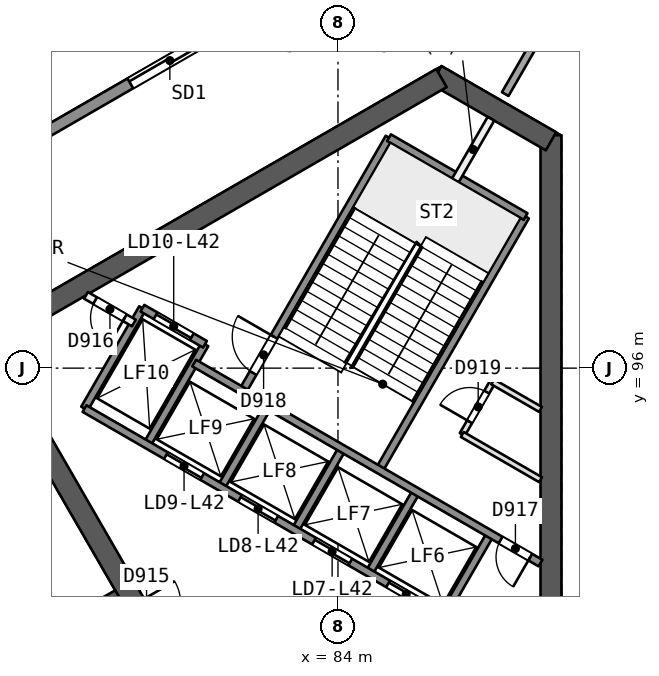
"""IFC4 building model, lengths in metres.
Left out: names, types, materials, properties, quantities, classifications, styles, units other than length and angle.
Written with IfcOpenShell. Run it as: python <this file> out.ifc"""

import sys

from ifc_helpers import new_model, si_unit, direction, frame, frame_2d, origin, place, context, subcontext, project, spatial, rectangle, extrude, element, fill, save


model = new_model("IFC4")
c1 = context("Model", 3, precision=1e-05, world=origin(), true_north=direction((0.0, 1.0)))
c2 = subcontext(c1, "Body", "Model", "MODEL_VIEW")
j1 = project(units=[si_unit("LENGTHUNIT", "METRE"), si_unit("PLANEANGLEUNIT", "RADIAN")], contexts=[c1])
p1 = place(None, origin())
s1 = spatial("IfcSite", under=j1, at=p1, CompositionType="ELEMENT")
p2 = place(p1, origin())
s2 = spatial("IfcBuilding", under=s1, at=p2, CompositionType="ELEMENT")
p3 = place(p2, frame((0.0, 0.0, 174.8)))
s3 = spatial("IfcBuildingStorey", under=s2, at=p3, CompositionType="ELEMENT", Elevation=174.8)
p4 = place(p3, frame((89.605, 88.069, 0.0), z_axis=(0.0, 0.0, 1.0), x_axis=(0.0, 1.0, 0.0)))
e1 = element("IfcWall", 1, at=p4, inside=s3, PredefinedType="SHEAR", context=c2, shape_type="SweptSolid", body=[
    extrude(rectangle(XDim=14.058, YDim=0.55, at=frame_2d((7.029, 0.0))), origin(), (0.0, 0.0, 1.0), 3.7),
])
p5 = place(p3, frame((89.605, 101.969, 0.0), z_axis=(0.0, 0.0, 1.0), x_axis=(-0.865997833373, 0.500047750313, 0.0)))
e2 = element("IfcWall", 2, at=p5, inside=s3, PredefinedType="SHEAR", context=c2, shape_type="SweptSolid", body=[
    extrude(rectangle(XDim=3.487, YDim=0.55, at=frame_2d((1.743, 0.0))), origin(), (0.0, 0.0, 1.0), 3.7),
])
p6 = place(p3, frame((86.723, 103.633, 0.0), z_axis=(0.0, 0.0, 1.0), x_axis=(-0.866023530946, -0.500003243837, 0.0)))
e3 = element("IfcWall", 3, at=p6, inside=s3, PredefinedType="SHEAR", context=c2, shape_type="SweptSolid", body=[
    extrude(rectangle(XDim=14.175, YDim=0.55, at=frame_2d((7.087, 0.0))), origin(), (0.0, 0.0, 1.0), 3.7),
])
p7 = place(p3, frame((74.686, 96.683, 0.0), z_axis=(0.0, 0.0, 1.0), x_axis=(0.499997818338, -0.866026663364, 0.0)))
e4 = element("IfcWall", 4, at=p7, inside=s3, PredefinedType="SHEAR", context=c2, shape_type="SweptSolid", body=[
    extrude(rectangle(XDim=10.105, YDim=0.55, at=frame_2d((5.052, 0.0))), origin(), (0.0, 0.0, 1.0), 3.7),
])
p8 = place(p7, frame((7.955, 0.0, 0.0)))
e5 = element("IfcOpeningElement", 5, at=p8, cuts=e4, PredefinedType="OPENING", context=c2, shape_type="SweptSolid", body=[
    extrude(rectangle(XDim=1.2, YDim=2.1, at=frame_2d((0.6, 1.05))), frame((0.0, 0.286, 0.0), z_axis=(0.0, -1.0, 0.0), x_axis=(1.0, 0.0, 0.0)), (0.0, 0.0, 1.0), 0.571),
])
p9 = place(p3, frame((78.2, 90.046, 0.0), z_axis=(0.0, 0.0, 1.0), x_axis=(-0.866026492143, -0.499998114903, 0.0)))
e6 = element("IfcWall", 6, at=p9, inside=s3, PredefinedType="SHEAR", context=c2, shape_type="SweptSolid", body=[
    extrude(rectangle(XDim=15.588, YDim=0.25, at=frame_2d((7.794, 0.0))), origin(), (0.0, 0.0, 1.0), 3.25),
])
p10 = place(p9, frame((2.306, 0.0, 0.0)))
e7 = element("IfcOpeningElement", 7, at=p10, cuts=e6, PredefinedType="OPENING", context=c2, shape_type="SweptSolid", body=[
    extrude(rectangle(XDim=1.0, YDim=2.1, at=frame_2d((0.5, 1.05))), frame((0.0, 0.135, 0.0), z_axis=(0.0, -1.0, 0.0), x_axis=(1.0, 0.0, 0.0)), (0.0, 0.0, 1.0), 0.271),
])
p11 = place(p9, frame((6.643, 0.0, 0.0)))
e8 = element("IfcOpeningElement", 8, at=p11, cuts=e6, PredefinedType="OPENING", context=c2, shape_type="SweptSolid", body=[
    extrude(rectangle(XDim=0.9, YDim=2.1, at=frame_2d((0.45, 1.05))), frame((0.0, 0.135, 0.0), z_axis=(0.0, -1.0, 0.0), x_axis=(1.0, 0.0, 0.0)), (0.0, 0.0, 1.0), 0.271),
])
p12 = place(p9, frame((9.604, 0.0, 0.0)))
e9 = element("IfcOpeningElement", 9, at=p12, cuts=e6, PredefinedType="OPENING", context=c2, shape_type="SweptSolid", body=[
    extrude(rectangle(XDim=0.9, YDim=2.1, at=frame_2d((0.45, 1.05))), frame((0.0, 0.135, 0.0), z_axis=(0.0, -1.0, 0.0), x_axis=(1.0, 0.0, 0.0)), (0.0, 0.0, 1.0), 0.271),
])
p13 = place(p9, frame((13.062, 0.0, 0.0)))
e10 = element("IfcOpeningElement", 10, at=p13, cuts=e6, PredefinedType="OPENING", context=c2, shape_type="SweptSolid", body=[
    extrude(rectangle(XDim=1.0, YDim=2.1, at=frame_2d((0.5, 1.05))), frame((0.0, 0.135, 0.0), z_axis=(0.0, -1.0, 0.0), x_axis=(1.0, 0.0, 0.0)), (0.0, 0.0, 1.0), 0.271),
])
p14 = place(p3, frame((91.135, 107.948, 0.0), z_axis=(0.0, 0.0, 1.0), x_axis=(-0.499980071345, -0.866036909293, 0.0)))
e11 = element("IfcWall", 11, at=p14, inside=s3, PredefinedType="PARTITIONING", context=c2, shape_type="SweptSolid", body=[
    extrude(rectangle(XDim=5.469, YDim=0.2, at=frame_2d((2.734, 0.0))), origin(), (0.0, 0.0, 1.0), 3.25),
])
p15 = place(p3, frame((72.136, 96.937, 0.0), z_axis=(0.0, 0.0, 1.0), x_axis=(0.499990139034, -0.866031096941, 0.0)))
e12 = element("IfcWall", 12, at=p15, inside=s3, PredefinedType="PARTITIONING", context=c2, shape_type="SweptSolid", body=[
    extrude(rectangle(XDim=9.0, YDim=0.2, at=frame_2d((4.5, 0.0))), origin(), (0.0, 0.0, 1.0), 3.25),
])
p16 = place(p3, frame((42.58, 82.733, 0.0), z_axis=(0.0, 0.0, 1.0), x_axis=(0.866025382531, 0.500000036812, 0.0)))
e13 = element("IfcWall", 13, at=p16, inside=s3, PredefinedType="SOLIDWALL", context=c2, shape_type="SweptSolid", body=[
    extrude(rectangle(XDim=53.42, YDim=0.3, at=frame_2d((26.71, 0.0))), origin(), (0.0, 0.0, 1.0), 3.25),
])
p17 = place(p16, frame((30.499, 0.0, 0.0)))
e14 = element("IfcOpeningElement", 14, at=p17, cuts=e13, PredefinedType="OPENING", context=c2, shape_type="SweptSolid", body=[
    extrude(rectangle(XDim=2.4, YDim=2.4, at=frame_2d((1.2, 1.2))), frame((0.0, 0.161, 0.0), z_axis=(0.0, -1.0, 0.0), x_axis=(1.0, 0.0, 0.0)), (0.0, 0.0, 1.0), 0.321),
])
p18 = place(p16, frame((41.52, 0.0, 0.0)))
e15 = element("IfcOpeningElement", 15, at=p18, cuts=e13, PredefinedType="OPENING", context=c2, shape_type="SweptSolid", body=[
    extrude(rectangle(XDim=2.4, YDim=2.4, at=frame_2d((1.2, 1.2))), frame((0.0, 0.161, 0.0), z_axis=(0.0, -1.0, 0.0), x_axis=(1.0, 0.0, 0.0)), (0.0, 0.0, 1.0), 0.321),
])
p19 = place(p16, frame((19.742, 0.0, 0.0)))
e16 = element("IfcOpeningElement", 16, at=p19, cuts=e13, PredefinedType="OPENING", context=c2, shape_type="SweptSolid", body=[
    extrude(rectangle(XDim=2.4, YDim=2.4, at=frame_2d((1.2, 1.2))), frame((0.0, 0.161, 0.0), z_axis=(0.0, -1.0, 0.0), x_axis=(1.0, 0.0, 0.0)), (0.0, 0.0, 1.0), 0.321),
])
p20 = place(p16, frame((9.507, 0.0, 0.0)))
e17 = element("IfcOpeningElement", 17, at=p20, cuts=e13, PredefinedType="OPENING", context=c2, shape_type="SweptSolid", body=[
    extrude(rectangle(XDim=2.4, YDim=2.4, at=frame_2d((1.2, 1.2))), frame((0.0, 0.161, 0.0), z_axis=(0.0, -1.0, 0.0), x_axis=(1.0, 0.0, 0.0)), (0.0, 0.0, 1.0), 0.321),
])
p21 = place(p16, frame((26.512, 0.0, 0.9)))
e18 = element("IfcOpeningElement", 18, at=p21, cuts=e13, PredefinedType="OPENING", context=c2, shape_type="SweptSolid", body=[
    extrude(rectangle(XDim=1.8, YDim=1.5, at=frame_2d((0.9, 0.75))), frame((0.0, 0.161, 0.0), z_axis=(0.0, -1.0, 0.0), x_axis=(1.0, 0.0, 0.0)), (0.0, 0.0, 1.0), 0.321),
])
p22 = place(p16, frame((23.55, 0.0, 0.9)))
e19 = element("IfcOpeningElement", 19, at=p22, cuts=e13, PredefinedType="OPENING", context=c2, shape_type="SweptSolid", body=[
    extrude(rectangle(XDim=1.8, YDim=1.5, at=frame_2d((0.9, 0.75))), frame((0.0, 0.161, 0.0), z_axis=(0.0, -1.0, 0.0), x_axis=(1.0, 0.0, 0.0)), (0.0, 0.0, 1.0), 0.321),
])
p23 = place(p3, frame((86.77, 89.486, 0.0), z_axis=(0.0, 0.0, 1.0), x_axis=(0.499961042966, 0.86604789447, 0.0)))
e20 = element("IfcWall", 20, at=p23, inside=s3, PredefinedType="SOLIDWALL", context=c2, shape_type="SweptSolid", body=[
    extrude(rectangle(XDim=2.48, YDim=0.2, at=frame_2d((1.24, 0.0))), origin(), (0.0, 0.0, 1.0), 3.25),
])
p24 = place(p3, frame((87.271, 94.254, 0.0), z_axis=(0.0, 0.0, 1.0), x_axis=(0.499995408039, 0.866028054938, 0.0)))
e21 = element("IfcWall", 21, at=p24, inside=s3, PredefinedType="PARTITIONING", context=c2, shape_type="SweptSolid", body=[
    extrude(rectangle(XDim=1.6, YDim=0.15, at=frame_2d((0.8, 0.0))), origin(), (0.0, 0.0, 1.0), 3.25),
])
p25 = place(p24, frame((0.387, 0.0, 0.0)))
e22 = element("IfcOpeningElement", 22, at=p25, cuts=e21, PredefinedType="OPENING", context=c2, shape_type="SweptSolid", body=[
    extrude(rectangle(XDim=0.9, YDim=2.1, at=frame_2d((0.45, 1.05))), frame((0.0, 0.085, 0.0), z_axis=(0.0, -1.0, 0.0), x_axis=(1.0, 0.0, 0.0)), (0.0, 0.0, 1.0), 0.171),
])
p26 = place(p3, frame((84.821, 90.611, 0.0), z_axis=(0.0, 0.0, 1.0), x_axis=(0.499961042966, 0.86604789447, 0.0)))
e23 = element("IfcWall", 23, at=p26, inside=s3, PredefinedType="SOLIDWALL", context=c2, shape_type="SweptSolid", body=[
    extrude(rectangle(XDim=2.48, YDim=0.2, at=frame_2d((1.24, 0.0))), origin(), (0.0, 0.0, 1.0), 3.25),
])
p27 = place(p3, frame((85.087, 93.321, 0.0), z_axis=(0.0, 0.0, 1.0), x_axis=(0.500019787375, 0.866013979237, 0.0)))
e24 = element("IfcWall", 24, at=p27, inside=s3, PredefinedType="SOLIDWALL", context=c2, shape_type="SweptSolid", body=[
    extrude(rectangle(XDim=7.7, YDim=0.2, at=frame_2d((3.85, 0.0))), origin(), (0.0, 0.0, 1.0), 3.25),
])
p28 = place(p3, frame((82.873, 91.736, 0.0), z_axis=(0.0, 0.0, 1.0), x_axis=(0.499961042966, 0.86604789447, 0.0)))
e25 = element("IfcWall", 25, at=p28, inside=s3, PredefinedType="SOLIDWALL", context=c2, shape_type="SweptSolid", body=[
    extrude(rectangle(XDim=2.48, YDim=0.2, at=frame_2d((1.24, 0.0))), origin(), (0.0, 0.0, 1.0), 3.25),
])
p29 = place(p3, frame((87.09, 100.94, 0.0), z_axis=(0.0, 0.0, 1.0), x_axis=(0.499951854219, 0.86605319898, 0.0)))
e26 = element("IfcWall", 26, at=p29, inside=s3, PredefinedType="PARTITIONING", context=c2, shape_type="SweptSolid", body=[
    extrude(rectangle(XDim=1.873, YDim=0.2, at=frame_2d((0.937, 0.0))), origin(), (0.0, 0.0, 1.0), 3.25),
])
p30 = place(p3, frame((80.924, 92.861, 0.0), z_axis=(0.0, 0.0, 1.0), x_axis=(0.499961042966, 0.86604789447, 0.0)))
e27 = element("IfcWall", 27, at=p30, inside=s3, PredefinedType="SOLIDWALL", context=c2, shape_type="SweptSolid", body=[
    extrude(rectangle(XDim=2.48, YDim=0.2, at=frame_2d((1.24, 0.0))), origin(), (0.0, 0.0, 1.0), 3.25),
])
p31 = place(p3, frame((81.493, 95.396, 0.0), z_axis=(0.0, 0.0, 1.0), x_axis=(0.500006057782, 0.866021906294, 0.0)))
e28 = element("IfcWall", 28, at=p31, inside=s3, PredefinedType="SOLIDWALL", context=c2, shape_type="SweptSolid", body=[
    extrude(rectangle(XDim=7.7, YDim=0.2, at=frame_2d((3.85, 0.0))), origin(), (0.0, 0.0, 1.0), 3.25),
])
p32 = place(p31, frame((0.55, 0.0, 0.0)))
e29 = element("IfcOpeningElement", 29, at=p32, cuts=e28, PredefinedType="OPENING", context=c2, shape_type="SweptSolid", body=[
    extrude(rectangle(XDim=1.1, YDim=2.1, at=frame_2d((0.55, 1.05))), frame((0.0, 0.11, 0.0), z_axis=(0.0, -1.0, 0.0), x_axis=(1.0, 0.0, 0.0)), (0.0, 0.0, 1.0), 0.221),
])
for number, where, z_axis, x_axis in (
    (30, (78.976, 93.986, 0.0), (0.0, 0.0, 1.0), (0.5, 0.866, 0.0)),
    (31, (77.33, 94.936, 0.0), (0.0, 0.0, 1.0), (0.5, 0.866, 0.0)),
):
    element("IfcWall", number, at=place(p3, frame(where, z_axis=z_axis, x_axis=x_axis)), inside=s3, PredefinedType="SOLIDWALL", context=c2, shape_type="SweptSolid", body=[
        extrude(rectangle(XDim=3.05, YDim=0.2, at=frame_2d((1.525, 0.0))), origin(), (0.0, 0.0, 1.0), 3.25),
    ])
p33 = place(p3, frame((86.77, 89.486, 0.0), z_axis=(0.0, 0.0, 1.0), x_axis=(-0.86601811187, 0.500012629753, 0.0)))
e32 = element("IfcWall", 32, at=p33, inside=s3, PredefinedType="SOLIDWALL", context=c2, shape_type="SweptSolid", body=[
    extrude(rectangle(XDim=10.9, YDim=0.2, at=frame_2d((5.45, 0.0))), origin(), (0.0, 0.0, 1.0), 3.25),
])
p34 = place(p33, frame((0.575, 0.0, 0.0)))
e33 = element("IfcOpeningElement", 33, at=p34, cuts=e32, PredefinedType="OPENING", context=c2, shape_type="SweptSolid", body=[
    extrude(rectangle(XDim=1.1, YDim=2.1, at=frame_2d((0.55, 1.05))), frame((0.0, 0.11, 0.0), z_axis=(0.0, -1.0, 0.0), x_axis=(1.0, 0.0, 0.0)), (0.0, 0.0, 1.0), 0.221),
])
p35 = place(p33, frame((2.825, 0.0, 0.0)))
e34 = element("IfcOpeningElement", 34, at=p35, cuts=e32, PredefinedType="OPENING", context=c2, shape_type="SweptSolid", body=[
    extrude(rectangle(XDim=1.1, YDim=2.1, at=frame_2d((0.55, 1.05))), frame((0.0, 0.11, 0.0), z_axis=(0.0, -1.0, 0.0), x_axis=(1.0, 0.0, 0.0)), (0.0, 0.0, 1.0), 0.221),
])
p36 = place(p33, frame((5.075, 0.0, 0.0)))
e35 = element("IfcOpeningElement", 35, at=p36, cuts=e32, PredefinedType="OPENING", context=c2, shape_type="SweptSolid", body=[
    extrude(rectangle(XDim=1.1, YDim=2.1, at=frame_2d((0.55, 1.05))), frame((0.0, 0.11, 0.0), z_axis=(0.0, -1.0, 0.0), x_axis=(1.0, 0.0, 0.0)), (0.0, 0.0, 1.0), 0.221),
])
p37 = place(p33, frame((7.325, 0.0, 0.0)))
e36 = element("IfcOpeningElement", 36, at=p37, cuts=e32, PredefinedType="OPENING", context=c2, shape_type="SweptSolid", body=[
    extrude(rectangle(XDim=1.1, YDim=2.1, at=frame_2d((0.55, 1.05))), frame((0.0, 0.11, 0.0), z_axis=(0.0, -1.0, 0.0), x_axis=(1.0, 0.0, 0.0)), (0.0, 0.0, 1.0), 0.221),
])
p38 = place(p3, frame((89.33, 90.872, 0.0), z_axis=(0.0, 0.0, 1.0), x_axis=(-0.866027589512, 0.49999621419, 0.0)))
e37 = element("IfcWall", 37, at=p38, inside=s3, PredefinedType="SOLIDWALL", context=c2, shape_type="SweptSolid", body=[
    extrude(rectangle(XDim=10.524, YDim=0.2, at=frame_2d((5.262, 0.0))), origin(), (0.0, 0.0, 1.0), 3.25),
])
p39 = place(p38, frame((0.312, 0.0, 0.0)))
e38 = element("IfcOpeningElement", 38, at=p39, cuts=e37, PredefinedType="OPENING", context=c2, shape_type="SweptSolid", body=[
    extrude(rectangle(XDim=0.9, YDim=2.1, at=frame_2d((0.45, 1.05))), frame((0.0, 0.11, 0.0), z_axis=(0.0, -1.0, 0.0), x_axis=(1.0, 0.0, 0.0)), (0.0, 0.0, 1.0), 0.221),
])
p40 = place(p3, frame((78.63, 97.188, 0.0), z_axis=(0.0, 0.0, 1.0), x_axis=(-0.866003949776, 0.500037157592, 0.0)))
e39 = element("IfcWall", 39, at=p40, inside=s3, PredefinedType="PARTITIONING", context=c2, shape_type="SweptSolid", body=[
    extrude(rectangle(XDim=1.455, YDim=0.2, at=frame_2d((0.728, 0.0))), origin(), (0.0, 0.0, 1.0), 3.25),
])
p41 = place(p40, frame((0.278, 0.0, 0.0)))
e40 = element("IfcOpeningElement", 40, at=p41, cuts=e39, PredefinedType="OPENING", context=c2, shape_type="SweptSolid", body=[
    extrude(rectangle(XDim=0.9, YDim=2.1, at=frame_2d((0.45, 1.05))), frame((0.0, 0.11, 0.0), z_axis=(0.0, -1.0, 0.0), x_axis=(1.0, 0.0, 0.0)), (0.0, 0.0, 1.0), 0.221),
])
p42 = place(p3, frame((80.5, 96.627, 0.0), z_axis=(0.0, 0.0, 1.0), x_axis=(-0.86601224135, 0.500022797313, 0.0)))
e41 = element("IfcWall", 41, at=p42, inside=s3, PredefinedType="SOLIDWALL", context=c2, shape_type="SweptSolid", body=[
    extrude(rectangle(XDim=1.9, YDim=0.2, at=frame_2d((0.95, 0.0))), origin(), (0.0, 0.0, 1.0), 3.25),
])
p43 = place(p42, frame((0.4, 0.0, 0.0)))
e42 = element("IfcOpeningElement", 42, at=p43, cuts=e41, PredefinedType="OPENING", context=c2, shape_type="SweptSolid", body=[
    extrude(rectangle(XDim=1.1, YDim=2.1, at=frame_2d((0.55, 1.05))), frame((0.0, 0.11, 0.0), z_axis=(0.0, -1.0, 0.0), x_axis=(1.0, 0.0, 0.0)), (0.0, 0.0, 1.0), 0.221),
])
p44 = place(p3, frame((89.33, 93.065, 0.0), z_axis=(0.0, 0.0, 1.0), x_axis=(-0.866041951395, 0.499971337603, 0.0)))
e43 = element("IfcWall", 43, at=p44, inside=s3, PredefinedType="PARTITIONING", context=c2, shape_type="SweptSolid", body=[
    extrude(rectangle(XDim=2.378, YDim=0.15, at=frame_2d((1.189, 0.0))), origin(), (0.0, 0.0, 1.0), 3.25),
])
p45 = place(p3, frame((89.33, 94.913, 0.0), z_axis=(0.0, 0.0, 1.0), x_axis=(-0.865981433661, 0.500076150755, 0.0)))
e44 = element("IfcWall", 44, at=p45, inside=s3, PredefinedType="PARTITIONING", context=c2, shape_type="SweptSolid", body=[
    extrude(rectangle(XDim=1.454, YDim=0.15, at=frame_2d((0.727, 0.0))), origin(), (0.0, 0.0, 1.0), 3.25),
])
p46 = place(p3, frame((88.937, 99.99, 0.0), z_axis=(0.0, 0.0, 1.0), x_axis=(-0.866004344652, 0.500036473714, 0.0)))
e45 = element("IfcWall", 45, at=p46, inside=s3, PredefinedType="SOLIDWALL", context=c2, shape_type="SweptSolid", body=[
    extrude(rectangle(XDim=4.15, YDim=0.2, at=frame_2d((2.075, 0.0))), origin(), (0.0, 0.0, 1.0), 3.25),
])
p47 = place(p18, origin())
e46 = element("IfcDoor", 46, at=p47, inside=s3, OperationType="SLIDING_TO_RIGHT", PredefinedType="NOTDEFINED", context=c2, shape_type="SweptSolid", body=[
    extrude(rectangle(XDim=2.4, YDim=2.4, at=frame_2d((1.2, 1.2))), frame((0.0, 0.025, 0.0), z_axis=(0.0, -1.0, 0.0), x_axis=(1.0, 0.0, 0.0)), (0.0, 0.0, 1.0), 0.05),
])
fill(e15, e46)
p48 = place(p34, origin())
e47 = element("IfcDoor", 47, at=p48, inside=s3, OperationType="SLIDING_TO_RIGHT", PredefinedType="NOTDEFINED", context=c2, shape_type="SweptSolid", body=[
    extrude(rectangle(XDim=1.1, YDim=2.1, at=frame_2d((0.55, 1.05))), frame((0.0, 0.025, 0.0), z_axis=(0.0, -1.0, 0.0), x_axis=(1.0, 0.0, 0.0)), (0.0, 0.0, 1.0), 0.05),
])
fill(e33, e47)
p49 = place(p35, origin())
e48 = element("IfcDoor", 48, at=p49, inside=s3, OperationType="SLIDING_TO_LEFT", PredefinedType="NOTDEFINED", context=c2, shape_type="SweptSolid", body=[
    extrude(rectangle(XDim=1.1, YDim=2.1, at=frame_2d((0.55, 1.05))), frame((0.0, 0.025, 0.0), z_axis=(0.0, -1.0, 0.0), x_axis=(1.0, 0.0, 0.0)), (0.0, 0.0, 1.0), 0.05),
])
fill(e34, e48)
p50 = place(p36, origin())
e49 = element("IfcDoor", 49, at=p50, inside=s3, OperationType="SLIDING_TO_RIGHT", PredefinedType="NOTDEFINED", context=c2, shape_type="SweptSolid", body=[
    extrude(rectangle(XDim=1.1, YDim=2.1, at=frame_2d((0.55, 1.05))), frame((0.0, 0.025, 0.0), z_axis=(0.0, -1.0, 0.0), x_axis=(1.0, 0.0, 0.0)), (0.0, 0.0, 1.0), 0.05),
])
fill(e35, e49)
p51 = place(p37, origin())
e50 = element("IfcDoor", 50, at=p51, inside=s3, OperationType="SLIDING_TO_LEFT", PredefinedType="NOTDEFINED", context=c2, shape_type="SweptSolid", body=[
    extrude(rectangle(XDim=1.1, YDim=2.1, at=frame_2d((0.55, 1.05))), frame((0.0, 0.025, 0.0), z_axis=(0.0, -1.0, 0.0), x_axis=(1.0, 0.0, 0.0)), (0.0, 0.0, 1.0), 0.05),
])
fill(e36, e50)
p52 = place(p43, origin())
e51 = element("IfcDoor", 51, at=p52, inside=s3, OperationType="SLIDING_TO_RIGHT", PredefinedType="NOTDEFINED", context=c2, shape_type="SweptSolid", body=[
    extrude(rectangle(XDim=1.1, YDim=2.1, at=frame_2d((0.55, 1.05))), frame((0.0, 0.025, 0.0), z_axis=(0.0, -1.0, 0.0), x_axis=(1.0, 0.0, 0.0)), (0.0, 0.0, 1.0), 0.05),
])
fill(e42, e51)
p53 = place(p41, origin())
e52 = element("IfcDoor", 52, at=p53, inside=s3, OperationType="SINGLE_SWING_LEFT", PredefinedType="NOTDEFINED", context=c2, shape_type="SweptSolid", body=[
    extrude(rectangle(XDim=0.9, YDim=2.1, at=frame_2d((0.45, 1.05))), frame((0.0, 0.025, 0.0), z_axis=(0.0, -1.0, 0.0), x_axis=(1.0, 0.0, 0.0)), (0.0, 0.0, 1.0), 0.05),
])
fill(e40, e52)
p54 = place(p39, origin())
e53 = element("IfcDoor", 53, at=p54, inside=s3, OperationType="SINGLE_SWING_LEFT", PredefinedType="NOTDEFINED", context=c2, shape_type="SweptSolid", body=[
    extrude(rectangle(XDim=0.9, YDim=2.1, at=frame_2d((0.45, 1.05))), frame((0.0, 0.025, 0.0), z_axis=(0.0, -1.0, 0.0), x_axis=(1.0, 0.0, 0.0)), (0.0, 0.0, 1.0), 0.05),
])
fill(e38, e53)
p55 = place(p32, origin())
e54 = element("IfcDoor", 54, at=p55, inside=s3, OperationType="SINGLE_SWING_RIGHT", PredefinedType="NOTDEFINED", context=c2, shape_type="SweptSolid", body=[
    extrude(rectangle(XDim=1.1, YDim=2.1, at=frame_2d((0.55, 1.05))), frame((0.0, 0.025, 0.0), z_axis=(0.0, -1.0, 0.0), x_axis=(1.0, 0.0, 0.0)), (0.0, 0.0, 1.0), 0.05),
])
fill(e29, e54)
p56 = place(p25, origin())
e55 = element("IfcDoor", 55, at=p56, inside=s3, OperationType="SINGLE_SWING_LEFT", PredefinedType="NOTDEFINED", context=c2, shape_type="SweptSolid", body=[
    extrude(rectangle(XDim=0.9, YDim=2.1, at=frame_2d((0.45, 1.05))), frame((0.0, 0.025, 0.0), z_axis=(0.0, -1.0, 0.0), x_axis=(1.0, 0.0, 0.0)), (0.0, 0.0, 1.0), 0.05),
])
fill(e22, e55)
save(model, sys.argv[1])
